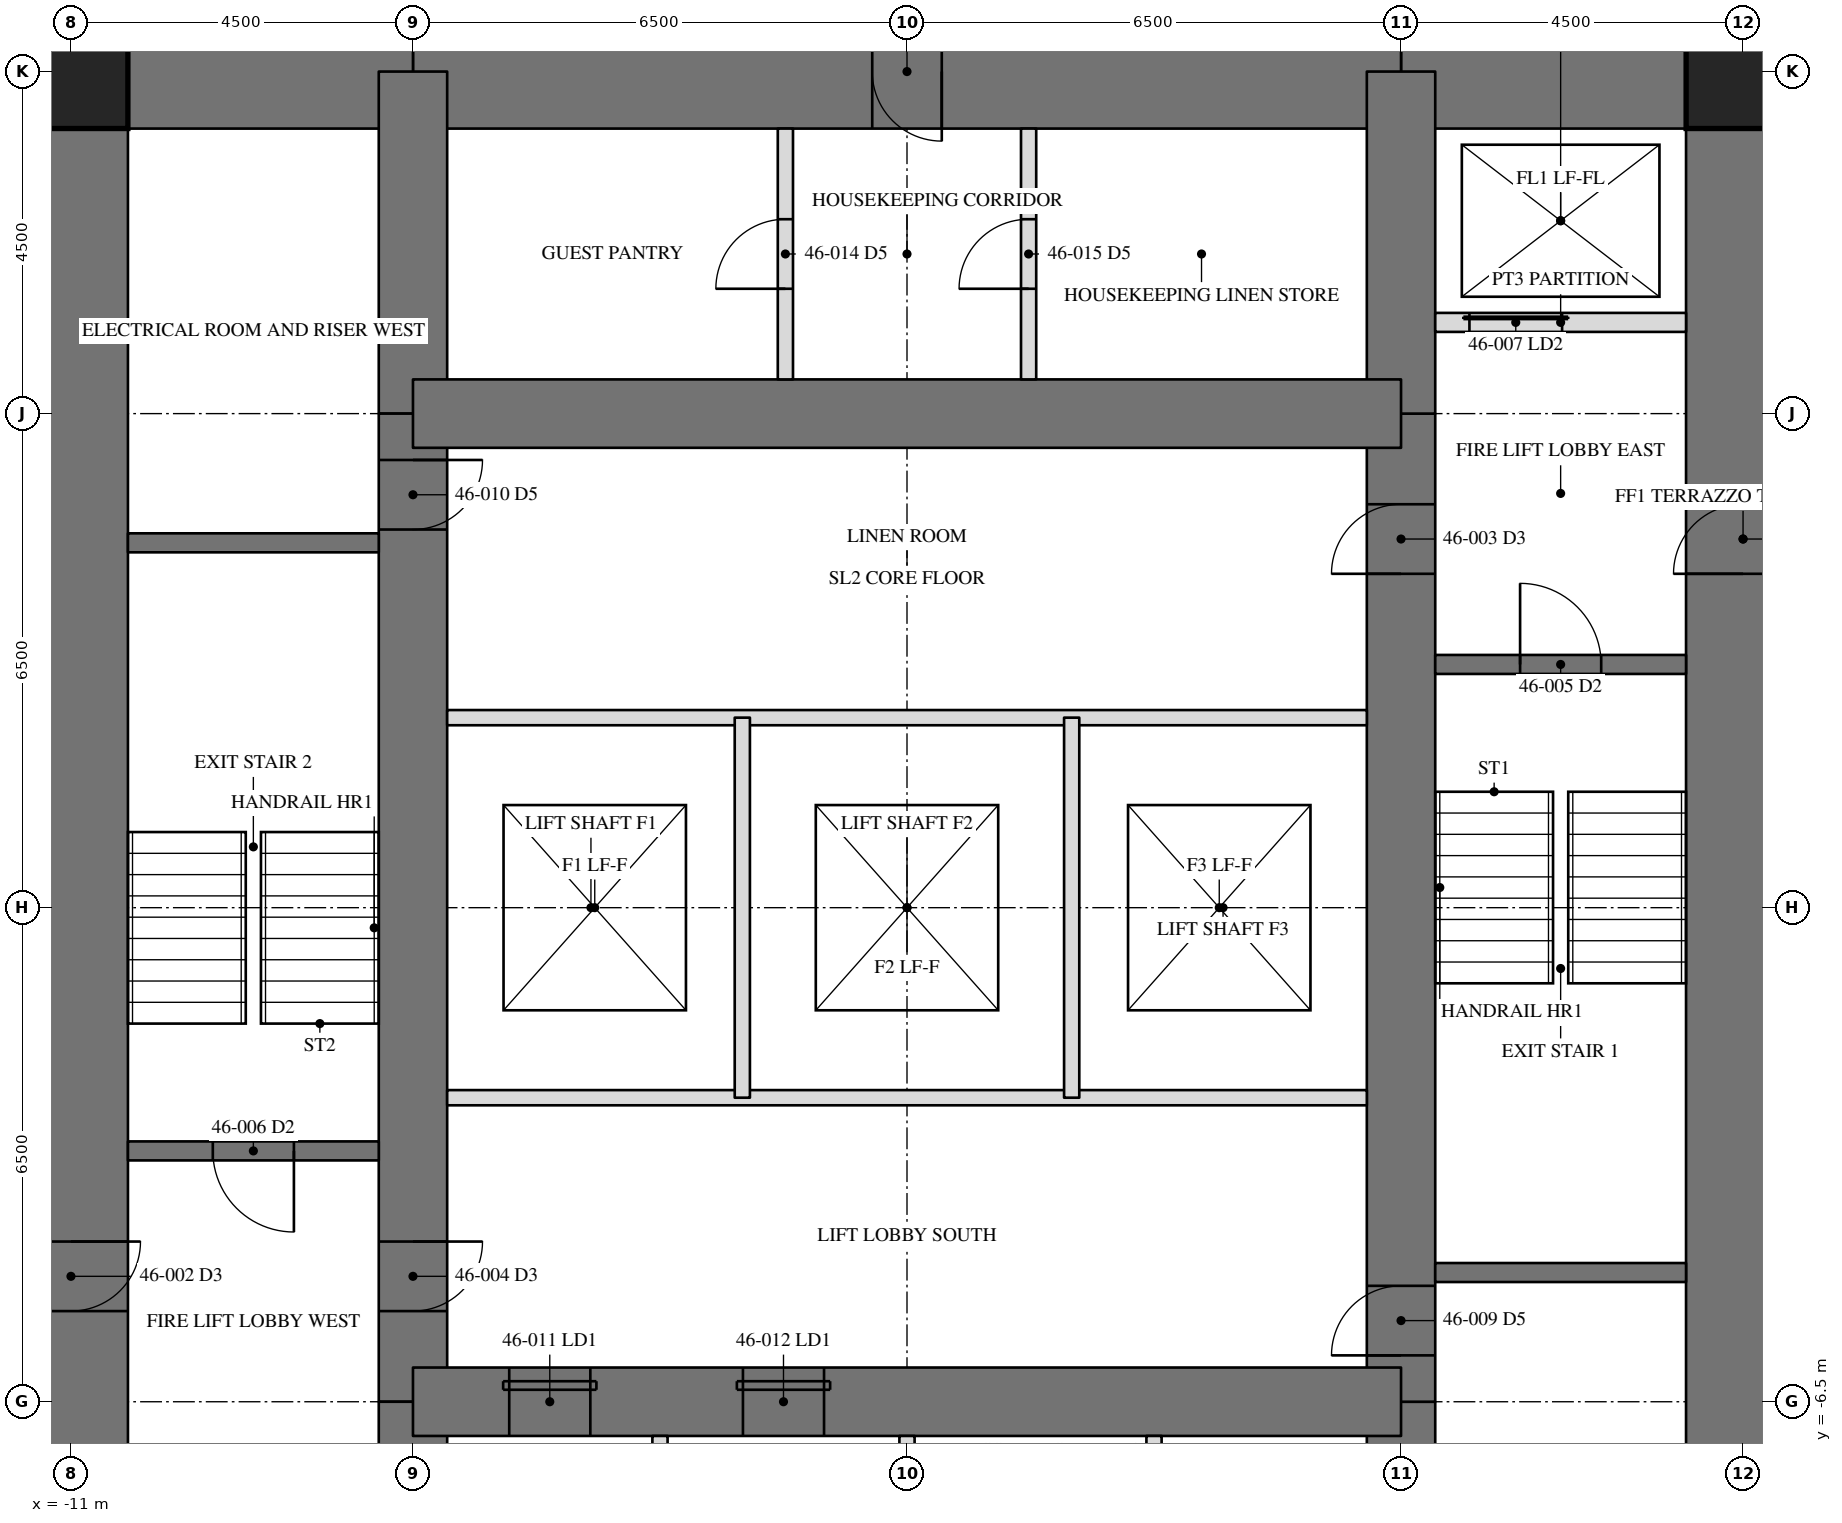
"""IFC4 building model, lengths in metres.
Left out: names, types, materials, properties, quantities, classifications, styles, units other than length and angle.
Written with IfcOpenShell. Run it as: python <this file> out.ifc"""

import sys

from ifc_helpers import new_model, si_unit, direction, frame, frame_2d, origin, origin_2d, place, context, subcontext, project, spatial, rectangle, hollow_rectangle, extrude, element, fill, save


model = new_model("IFC4")
c1 = context("Model", 3, precision=1e-05, world=origin(), true_north=direction((0.0, 1.0)))
c2 = subcontext(c1, "Body", "Model", "MODEL_VIEW")
j1 = project(units=[si_unit("LENGTHUNIT", "METRE"), si_unit("PLANEANGLEUNIT", "RADIAN")], contexts=[c1])
p1 = place(None, origin())
s1 = spatial("IfcSite", under=j1, at=p1, CompositionType="ELEMENT")
p2 = place(p1, origin())
s2 = spatial("IfcBuilding", under=s1, at=p2, CompositionType="ELEMENT")
p3 = place(p2, frame((0.0, 0.0, 197.7)))
s3 = spatial("IfcBuildingStorey", under=s2, at=p3, CompositionType="ELEMENT", Elevation=197.7)
p4 = place(p3, frame((11.0, -11.0, 0.0), z_axis=(0.0, 0.0, 1.0), x_axis=(0.0, 1.0, 0.0)))
e1 = element("IfcWall", 1, at=p4, inside=s3, PredefinedType="SHEAR", context=c2, shape_type="SweptSolid", body=[
    extrude(rectangle(XDim=22.0, YDim=1.5, at=frame_2d((11.0, 0.0))), origin(), (0.0, 0.0, 1.0), 3.5),
])
p5 = place(p4, frame((15.393, 0.0, 0.0)))
e2 = element("IfcOpeningElement", 2, at=p5, cuts=e1, PredefinedType="OPENING", context=c2, shape_type="SweptSolid", body=[
    extrude(rectangle(XDim=0.915, YDim=2.134, at=frame_2d((0.458, 1.067))), frame((0.0, 0.76, 0.0), z_axis=(0.0, -1.0, 0.0), x_axis=(1.0, 0.0, 0.0)), (0.0, 0.0, 1.0), 1.52),
])
p6 = place(p3, frame((-11.0, 11.0, 0.0), z_axis=(0.0, 0.0, 1.0), x_axis=(0.0, -1.0, 0.0)))
e3 = element("IfcWall", 3, at=p6, inside=s3, PredefinedType="SHEAR", context=c2, shape_type="SweptSolid", body=[
    extrude(rectangle(XDim=22.0, YDim=1.5, at=frame_2d((11.0, 0.0))), origin(), (0.0, 0.0, 1.0), 3.5),
])
p7 = place(p6, frame((15.393, 0.0, 0.0)))
e4 = element("IfcOpeningElement", 4, at=p7, cuts=e3, PredefinedType="OPENING", context=c2, shape_type="SweptSolid", body=[
    extrude(rectangle(XDim=0.915, YDim=2.134, at=frame_2d((0.458, 1.067))), frame((0.0, 0.76, 0.0), z_axis=(0.0, -1.0, 0.0), x_axis=(1.0, 0.0, 0.0)), (0.0, 0.0, 1.0), 1.52),
])
p8 = place(p3, frame((11.0, 11.0, 0.0), z_axis=(0.0, 0.0, 1.0), x_axis=(-1.0, 0.0, 0.0)))
e5 = element("IfcWall", 5, at=p8, inside=s3, PredefinedType="SHEAR", context=c2, shape_type="SweptSolid", body=[
    extrude(rectangle(XDim=4.5, YDim=1.5, at=frame_2d((2.25, 0.0))), origin(), (0.0, 0.0, 1.0), 3.5),
])
p9 = place(p3, frame((6.5, 11.0, 0.0), z_axis=(0.0, 0.0, 1.0), x_axis=(-1.0, 0.0, 0.0)))
e6 = element("IfcWall", 6, at=p9, inside=s3, PredefinedType="SHEAR", context=c2, shape_type="SweptSolid", body=[
    extrude(rectangle(XDim=13.0, YDim=1.5, at=frame_2d((6.5, 0.0))), origin(), (0.0, 0.0, 1.0), 3.5),
])
p10 = place(p9, frame((6.042, 0.0, 0.0)))
e7 = element("IfcOpeningElement", 7, at=p10, cuts=e6, PredefinedType="OPENING", context=c2, shape_type="SweptSolid", body=[
    extrude(rectangle(XDim=0.915, YDim=2.134, at=frame_2d((0.458, 1.067))), frame((0.0, 0.76, 0.0), z_axis=(0.0, -1.0, 0.0), x_axis=(1.0, 0.0, 0.0)), (0.0, 0.0, 1.0), 1.52),
])
p11 = place(p3, frame((-6.5, 11.0, 0.0), z_axis=(0.0, 0.0, 1.0), x_axis=(-1.0, 0.0, 0.0)))
e8 = element("IfcWall", 8, at=p11, inside=s3, PredefinedType="SHEAR", context=c2, shape_type="SweptSolid", body=[
    extrude(rectangle(XDim=4.5, YDim=1.5, at=frame_2d((2.25, 0.0))), origin(), (0.0, 0.0, 1.0), 3.5),
])
p12 = place(p3, frame((6.5, -11.0, 0.0), z_axis=(0.0, 0.0, 1.0), x_axis=(0.0, 1.0, 0.0)))
e9 = element("IfcWall", 9, at=p12, inside=s3, PredefinedType="SHEAR", context=c2, shape_type="SweptSolid", body=[
    extrude(rectangle(XDim=4.5, YDim=0.9, at=frame_2d((2.25, 0.0))), origin(), (0.0, 0.0, 1.0), 3.5),
])
p13 = place(p3, frame((6.5, -6.5, 0.0), z_axis=(0.0, 0.0, 1.0), x_axis=(0.0, 1.0, 0.0)))
e10 = element("IfcWall", 10, at=p13, inside=s3, PredefinedType="SHEAR", context=c2, shape_type="SweptSolid", body=[
    extrude(rectangle(XDim=13.0, YDim=0.9, at=frame_2d((6.5, 0.0))), origin(), (0.0, 0.0, 1.0), 3.5),
])
p14 = place(p13, frame((10.893, 0.0, 0.0)))
e11 = element("IfcOpeningElement", 11, at=p14, cuts=e10, PredefinedType="OPENING", context=c2, shape_type="SweptSolid", body=[
    extrude(rectangle(XDim=0.915, YDim=2.134, at=frame_2d((0.458, 1.067))), frame((0.0, 0.46, 0.0), z_axis=(0.0, -1.0, 0.0), x_axis=(1.0, 0.0, 0.0)), (0.0, 0.0, 1.0), 0.92),
])
p15 = place(p13, frame((0.61, 0.0, 0.0)))
e12 = element("IfcOpeningElement", 12, at=p15, cuts=e10, PredefinedType="OPENING", context=c2, shape_type="SweptSolid", body=[
    extrude(rectangle(XDim=0.915, YDim=2.134, at=frame_2d((0.458, 1.067))), frame((0.0, 0.46, 0.0), z_axis=(0.0, -1.0, 0.0), x_axis=(1.0, 0.0, 0.0)), (0.0, 0.0, 1.0), 0.92),
])
for number, where, z_axis, x_axis in (
    (13, (6.5, 6.5, 0.0), (0.0, 0.0, 1.0), (0.0, 1.0, 0.0)),
    (14, (-6.5, 11.0, 0.0), (0.0, 0.0, 1.0), (0.0, -1.0, 0.0)),
):
    element("IfcWall", number, at=place(p3, frame(where, z_axis=z_axis, x_axis=x_axis)), inside=s3, PredefinedType="SHEAR", context=c2, shape_type="SweptSolid", body=[
        extrude(rectangle(XDim=4.5, YDim=0.9, at=frame_2d((2.25, 0.0))), origin(), (0.0, 0.0, 1.0), 3.5),
    ])
p16 = place(p3, frame((-6.5, 6.5, 0.0), z_axis=(0.0, 0.0, 1.0), x_axis=(0.0, -1.0, 0.0)))
e15 = element("IfcWall", 15, at=p16, inside=s3, PredefinedType="SHEAR", context=c2, shape_type="SweptSolid", body=[
    extrude(rectangle(XDim=13.0, YDim=0.9, at=frame_2d((6.5, 0.0))), origin(), (0.0, 0.0, 1.0), 3.5),
])
p17 = place(p16, frame((10.893, 0.0, 0.0)))
e16 = element("IfcOpeningElement", 16, at=p17, cuts=e15, PredefinedType="OPENING", context=c2, shape_type="SweptSolid", body=[
    extrude(rectangle(XDim=0.915, YDim=2.134, at=frame_2d((0.458, 1.067))), frame((0.0, 0.46, 0.0), z_axis=(0.0, -1.0, 0.0), x_axis=(1.0, 0.0, 0.0)), (0.0, 0.0, 1.0), 0.92),
])
p18 = place(p16, frame((0.61, 0.0, 0.0)))
e17 = element("IfcOpeningElement", 17, at=p18, cuts=e15, PredefinedType="OPENING", context=c2, shape_type="SweptSolid", body=[
    extrude(rectangle(XDim=0.915, YDim=2.134, at=frame_2d((0.458, 1.067))), frame((0.0, 0.46, 0.0), z_axis=(0.0, -1.0, 0.0), x_axis=(1.0, 0.0, 0.0)), (0.0, 0.0, 1.0), 0.92),
])
p19 = place(p3, frame((-6.5, -6.5, 0.0), z_axis=(0.0, 0.0, 1.0), x_axis=(0.0, -1.0, 0.0)))
e18 = element("IfcWall", 18, at=p19, inside=s3, PredefinedType="SHEAR", context=c2, shape_type="SweptSolid", body=[
    extrude(rectangle(XDim=4.5, YDim=0.9, at=frame_2d((2.25, 0.0))), origin(), (0.0, 0.0, 1.0), 3.5),
])
p20 = place(p3, frame((6.5, 6.5, 0.0), z_axis=(0.0, 0.0, 1.0), x_axis=(-1.0, 0.0, 0.0)))
e19 = element("IfcWall", 19, at=p20, inside=s3, PredefinedType="SHEAR", context=c2, shape_type="SweptSolid", body=[
    extrude(rectangle(XDim=13.0, YDim=0.9, at=frame_2d((6.5, 0.0))), origin(), (0.0, 0.0, 1.0), 3.5),
])
p21 = place(p3, frame((-6.5, -6.5, 0.0), z_axis=(0.0, 0.0, 1.0), x_axis=(1.0, 0.0, 0.0)))
e20 = element("IfcWall", 20, at=p21, inside=s3, PredefinedType="SHEAR", context=c2, shape_type="SweptSolid", body=[
    extrude(rectangle(XDim=13.0, YDim=0.9, at=frame_2d((6.5, 0.0))), origin(), (0.0, 0.0, 1.0), 3.5),
])
p22 = place(p21, frame((1.267, 0.0, 0.0)))
e21 = element("IfcOpeningElement", 21, at=p22, cuts=e20, PredefinedType="OPENING", context=c2, shape_type="SweptSolid", body=[
    extrude(rectangle(XDim=1.067, YDim=2.134, at=frame_2d((0.533, 1.067))), frame((0.0, 0.46, 0.0), z_axis=(0.0, -1.0, 0.0), x_axis=(1.0, 0.0, 0.0)), (0.0, 0.0, 1.0), 0.92),
])
p23 = place(p21, frame((4.342, 0.0, 0.0)))
e22 = element("IfcOpeningElement", 22, at=p23, cuts=e20, PredefinedType="OPENING", context=c2, shape_type="SweptSolid", body=[
    extrude(rectangle(XDim=1.067, YDim=2.134, at=frame_2d((0.533, 1.067))), frame((0.0, 0.46, 0.0), z_axis=(0.0, -1.0, 0.0), x_axis=(1.0, 0.0, 0.0)), (0.0, 0.0, 1.0), 0.92),
])
for number, where, z_axis, x_axis in (
    (23, (11.0, 11.0, 0.0), (0.0, 0.0, 1.0), (1.0, 0.0, 0.0)),
    (24, (-11.0, 11.0, 0.0), (0.0, 0.0, 1.0), (1.0, 0.0, 0.0)),
):
    element("IfcColumn", number, at=place(p3, frame(where, z_axis=z_axis, x_axis=x_axis)), inside=s3, PredefinedType="COLUMN", context=c2, shape_type="SweptSolid", body=[
        extrude(hollow_rectangle(XDim=1.499, YDim=1.499, WallThickness=0.102, at=origin_2d()), origin(), (0.0, 0.0, 1.0), 3.5),
    ])
for number, where, z_axis, x_axis in (
    (25, (6.95, -4.8, 0.0), (0.0, 0.0, 1.0), (1.0, 0.0, 0.0)),
    (26, (-6.95, 4.8, 0.0), (0.0, 0.0, 1.0), (-1.0, 0.0, 0.0)),
):
    element("IfcWall", number, at=place(p3, frame(where, z_axis=z_axis, x_axis=x_axis)), inside=s3, PredefinedType="SOLIDWALL", context=c2, shape_type="SweptSolid", body=[
        extrude(rectangle(XDim=3.3, YDim=0.25, at=frame_2d((1.65, 0.0))), origin(), (0.0, 0.0, 1.0), 3.31),
    ])
p24 = place(p3, frame((6.95, 3.2, 0.0), z_axis=(0.0, 0.0, 1.0), x_axis=(1.0, 0.0, 0.0)))
e27 = element("IfcWall", 27, at=p24, inside=s3, PredefinedType="SOLIDWALL", context=c2, shape_type="SweptSolid", body=[
    extrude(rectangle(XDim=3.3, YDim=0.25, at=frame_2d((1.65, 0.0))), origin(), (0.0, 0.0, 1.0), 3.31),
])
p25 = place(p24, frame((1.116, 0.0, 0.0)))
e28 = element("IfcOpeningElement", 28, at=p25, cuts=e27, PredefinedType="OPENING", context=c2, shape_type="SweptSolid", body=[
    extrude(rectangle(XDim=1.067, YDim=2.134, at=frame_2d((0.533, 1.067))), frame((0.0, 0.135, 0.0), z_axis=(0.0, -1.0, 0.0), x_axis=(1.0, 0.0, 0.0)), (0.0, 0.0, 1.0), 0.27),
])
p26 = place(p3, frame((-6.95, -3.2, 0.0), z_axis=(0.0, 0.0, 1.0), x_axis=(-1.0, 0.0, 0.0)))
e29 = element("IfcWall", 29, at=p26, inside=s3, PredefinedType="SOLIDWALL", context=c2, shape_type="SweptSolid", body=[
    extrude(rectangle(XDim=3.3, YDim=0.25, at=frame_2d((1.65, 0.0))), origin(), (0.0, 0.0, 1.0), 3.31),
])
p27 = place(p26, frame((1.116, 0.0, 0.0)))
e30 = element("IfcOpeningElement", 30, at=p27, cuts=e29, PredefinedType="OPENING", context=c2, shape_type="SweptSolid", body=[
    extrude(rectangle(XDim=1.067, YDim=2.134, at=frame_2d((0.533, 1.067))), frame((0.0, 0.135, 0.0), z_axis=(0.0, -1.0, 0.0), x_axis=(1.0, 0.0, 0.0)), (0.0, 0.0, 1.0), 0.27),
])
p28 = place(p3, frame((6.95, 7.7, 0.0), z_axis=(0.0, 0.0, 1.0), x_axis=(1.0, 0.0, 0.0)))
e31 = element("IfcWall", 31, at=p28, inside=s3, PredefinedType="PARTITIONING", context=c2, shape_type="SweptSolid", body=[
    extrude(rectangle(XDim=3.3, YDim=0.25, at=frame_2d((1.65, 0.0))), origin(), (0.0, 0.0, 1.0), 3.31),
])
p29 = place(p28, frame((0.45, 0.0, 0.0)))
e32 = element("IfcOpeningElement", 32, at=p29, cuts=e31, PredefinedType="OPENING", context=c2, shape_type="SweptSolid", body=[
    extrude(rectangle(XDim=1.219, YDim=2.134, at=frame_2d((0.609, 1.067))), frame((0.0, 0.135, 0.0), z_axis=(0.0, -1.0, 0.0), x_axis=(1.0, 0.0, 0.0)), (0.0, 0.0, 1.0), 0.27),
])
for number, where, z_axis, x_axis in (
    (33, (-6.05, 2.5, 0.0), (0.0, 0.0, 1.0), (1.0, 0.0, 0.0)),
    (34, (6.05, -2.5, 0.0), (0.0, 0.0, 1.0), (-1.0, 0.0, 0.0)),
):
    element("IfcWall", number, at=place(p3, frame(where, z_axis=z_axis, x_axis=x_axis)), inside=s3, PredefinedType="PARTITIONING", context=c2, shape_type="SweptSolid", body=[
        extrude(rectangle(XDim=12.1, YDim=0.2, at=frame_2d((6.05, 0.0))), origin(), (0.0, 0.0, 1.0), 3.31),
    ])
for number, where, z_axis, x_axis in (
    (35, (-3.25, -10.25, 0.0), (0.0, 0.0, 1.0), (0.0, 1.0, 0.0)),
    (36, (0.0, -10.25, 0.0), (0.0, 0.0, 1.0), (0.0, 1.0, 0.0)),
    (37, (3.25, -10.25, 0.0), (0.0, 0.0, 1.0), (0.0, 1.0, 0.0)),
):
    element("IfcWall", number, at=place(p3, frame(where, z_axis=z_axis, x_axis=x_axis)), inside=s3, PredefinedType="PARTITIONING", context=c2, shape_type="SweptSolid", body=[
        extrude(rectangle(XDim=3.3, YDim=0.2, at=frame_2d((1.65, 0.0))), origin(), (0.0, 0.0, 1.0), 3.31),
    ])
for number, where, z_axis, x_axis in (
    (38, (-2.167, -2.5, 0.0), (0.0, 0.0, 1.0), (0.0, 1.0, 0.0)),
    (39, (2.167, -2.5, 0.0), (0.0, 0.0, 1.0), (0.0, 1.0, 0.0)),
):
    element("IfcWall", number, at=place(p3, frame(where, z_axis=z_axis, x_axis=x_axis)), inside=s3, PredefinedType="PARTITIONING", context=c2, shape_type="SweptSolid", body=[
        extrude(rectangle(XDim=5.0, YDim=0.2, at=frame_2d((2.5, 0.0))), origin(), (0.0, 0.0, 1.0), 3.31),
    ])
p30 = place(p3, frame((-1.6, 6.95, 0.0), z_axis=(0.0, 0.0, 1.0), x_axis=(0.0, 1.0, 0.0)))
e40 = element("IfcWall", 40, at=p30, inside=s3, PredefinedType="PARTITIONING", context=c2, shape_type="SweptSolid", body=[
    extrude(rectangle(XDim=3.3, YDim=0.2, at=frame_2d((1.65, 0.0))), origin(), (0.0, 0.0, 1.0), 3.31),
])
p31 = place(p30, frame((1.192, 0.0, 0.0)))
e41 = element("IfcOpeningElement", 41, at=p31, cuts=e40, PredefinedType="OPENING", context=c2, shape_type="SweptSolid", body=[
    extrude(rectangle(XDim=0.915, YDim=2.134, at=frame_2d((0.458, 1.067))), frame((0.0, 0.11, 0.0), z_axis=(0.0, -1.0, 0.0), x_axis=(1.0, 0.0, 0.0)), (0.0, 0.0, 1.0), 0.22),
])
p32 = place(p3, frame((1.6, 6.95, 0.0), z_axis=(0.0, 0.0, 1.0), x_axis=(0.0, 1.0, 0.0)))
e42 = element("IfcWall", 42, at=p32, inside=s3, PredefinedType="PARTITIONING", context=c2, shape_type="SweptSolid", body=[
    extrude(rectangle(XDim=3.3, YDim=0.2, at=frame_2d((1.65, 0.0))), origin(), (0.0, 0.0, 1.0), 3.31),
])
p33 = place(p32, frame((1.192, 0.0, 0.0)))
e43 = element("IfcOpeningElement", 43, at=p33, cuts=e42, PredefinedType="OPENING", context=c2, shape_type="SweptSolid", body=[
    extrude(rectangle(XDim=0.915, YDim=2.134, at=frame_2d((0.458, 1.067))), frame((0.0, 0.11, 0.0), z_axis=(0.0, -1.0, 0.0), x_axis=(1.0, 0.0, 0.0)), (0.0, 0.0, 1.0), 0.22),
])
p34 = place(p14, origin())
e44 = element("IfcDoor", 44, at=p34, inside=s3, OperationType="SINGLE_SWING_RIGHT", PredefinedType="DOOR", context=c2, shape_type="SweptSolid", body=[
    extrude(rectangle(XDim=0.915, YDim=2.134, at=frame_2d((0.458, 1.067))), frame((0.0, -0.375, 0.0), z_axis=(0.0, -1.0, 0.0), x_axis=(1.0, 0.0, 0.0)), (0.0, 0.0, 1.0), 0.05),
])
fill(e11, e44)
p35 = place(p17, origin())
e45 = element("IfcDoor", 45, at=p35, inside=s3, OperationType="SINGLE_SWING_RIGHT", PredefinedType="DOOR", context=c2, shape_type="SweptSolid", body=[
    extrude(rectangle(XDim=0.915, YDim=2.134, at=frame_2d((0.458, 1.067))), frame((0.0, -0.375, 0.0), z_axis=(0.0, -1.0, 0.0), x_axis=(1.0, 0.0, 0.0)), (0.0, 0.0, 1.0), 0.05),
])
fill(e16, e45)
p36 = place(p25, origin())
e46 = element("IfcDoor", 46, at=p36, inside=s3, OperationType="SINGLE_SWING_LEFT", PredefinedType="DOOR", context=c2, shape_type="SweptSolid", body=[
    extrude(rectangle(XDim=1.067, YDim=2.134, at=frame_2d((0.533, 1.067))), frame((0.0, 0.025, 0.0), z_axis=(0.0, -1.0, 0.0), x_axis=(1.0, 0.0, 0.0)), (0.0, 0.0, 1.0), 0.05),
])
fill(e28, e46)
p37 = place(p27, origin())
e47 = element("IfcDoor", 47, at=p37, inside=s3, OperationType="SINGLE_SWING_LEFT", PredefinedType="DOOR", context=c2, shape_type="SweptSolid", body=[
    extrude(rectangle(XDim=1.067, YDim=2.134, at=frame_2d((0.533, 1.067))), frame((0.0, 0.025, 0.0), z_axis=(0.0, -1.0, 0.0), x_axis=(1.0, 0.0, 0.0)), (0.0, 0.0, 1.0), 0.05),
])
fill(e30, e47)
p38 = place(p29, origin())
e48 = element("IfcDoor", 48, at=p38, inside=s3, OperationType="SLIDING_TO_LEFT", PredefinedType="DOOR", context=c2, shape_type="SweptSolid", body=[
    extrude(rectangle(XDim=1.219, YDim=2.134, at=frame_2d((0.609, 1.067))), frame((0.0, 0.025, 0.0), z_axis=(0.0, -1.0, 0.0), x_axis=(1.0, 0.0, 0.0)), (0.0, 0.0, 1.0), 0.05),
])
fill(e32, e48)
p39 = place(p15, origin())
e49 = element("IfcDoor", 49, at=p39, inside=s3, OperationType="SINGLE_SWING_RIGHT", PredefinedType="DOOR", context=c2, shape_type="SweptSolid", body=[
    extrude(rectangle(XDim=0.915, YDim=2.134, at=frame_2d((0.458, 1.067))), frame((0.0, -0.375, 0.0), z_axis=(0.0, -1.0, 0.0), x_axis=(1.0, 0.0, 0.0)), (0.0, 0.0, 1.0), 0.05),
])
fill(e12, e49)
p40 = place(p18, origin())
e50 = element("IfcDoor", 50, at=p40, inside=s3, OperationType="SINGLE_SWING_RIGHT", PredefinedType="DOOR", context=c2, shape_type="SweptSolid", body=[
    extrude(rectangle(XDim=0.915, YDim=2.134, at=frame_2d((0.458, 1.067))), frame((0.0, -0.375, 0.0), z_axis=(0.0, -1.0, 0.0), x_axis=(1.0, 0.0, 0.0)), (0.0, 0.0, 1.0), 0.05),
])
fill(e17, e50)
p41 = place(p22, origin())
e51 = element("IfcDoor", 51, at=p41, inside=s3, OperationType="SLIDING_TO_LEFT", PredefinedType="DOOR", context=c2, shape_type="SweptSolid", body=[
    extrude(rectangle(XDim=1.067, YDim=2.134, at=frame_2d((0.533, 1.067))), frame((0.0, -0.375, 0.0), z_axis=(0.0, -1.0, 0.0), x_axis=(1.0, 0.0, 0.0)), (0.0, 0.0, 1.0), 0.05),
])
fill(e21, e51)
p42 = place(p23, origin())
e52 = element("IfcDoor", 52, at=p42, inside=s3, OperationType="SLIDING_TO_LEFT", PredefinedType="DOOR", context=c2, shape_type="SweptSolid", body=[
    extrude(rectangle(XDim=1.067, YDim=2.134, at=frame_2d((0.533, 1.067))), frame((0.0, -0.375, 0.0), z_axis=(0.0, -1.0, 0.0), x_axis=(1.0, 0.0, 0.0)), (0.0, 0.0, 1.0), 0.05),
])
fill(e22, e52)
p43 = place(p10, origin())
e53 = element("IfcDoor", 53, at=p43, inside=s3, OperationType="SINGLE_SWING_RIGHT", PredefinedType="DOOR", context=c2, shape_type="SweptSolid", body=[
    extrude(rectangle(XDim=0.915, YDim=2.134, at=frame_2d((0.458, 1.067))), frame((0.0, 0.025, 0.0), z_axis=(0.0, -1.0, 0.0), x_axis=(1.0, 0.0, 0.0)), (0.0, 0.0, 1.0), 0.05),
])
fill(e7, e53)
p44 = place(p31, origin())
e54 = element("IfcDoor", 54, at=p44, inside=s3, OperationType="SINGLE_SWING_RIGHT", PredefinedType="DOOR", context=c2, shape_type="SweptSolid", body=[
    extrude(rectangle(XDim=0.915, YDim=2.134, at=frame_2d((0.458, 1.067))), frame((0.0, 0.025, 0.0), z_axis=(0.0, -1.0, 0.0), x_axis=(1.0, 0.0, 0.0)), (0.0, 0.0, 1.0), 0.05),
])
fill(e41, e54)
p45 = place(p33, origin())
e55 = element("IfcDoor", 55, at=p45, inside=s3, OperationType="SINGLE_SWING_RIGHT", PredefinedType="DOOR", context=c2, shape_type="SweptSolid", body=[
    extrude(rectangle(XDim=0.915, YDim=2.134, at=frame_2d((0.458, 1.067))), frame((0.0, 0.025, 0.0), z_axis=(0.0, -1.0, 0.0), x_axis=(1.0, 0.0, 0.0)), (0.0, 0.0, 1.0), 0.05),
])
fill(e43, e55)
save(model, sys.argv[1])
